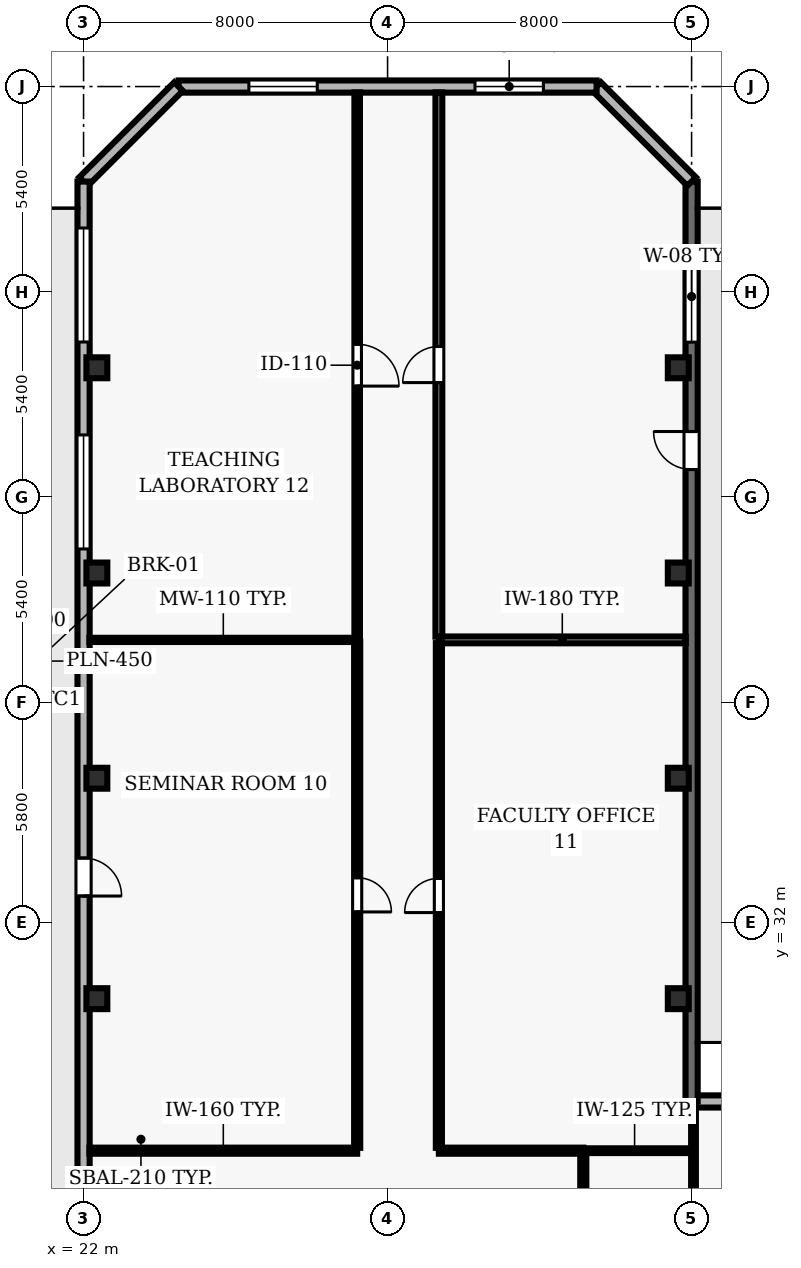
"""IFC4 building model, lengths in metres.
Left out: names, types, materials, properties, quantities, classifications, styles, units other than length and angle.
Written with IfcOpenShell. Run it as: python <this file> out.ifc"""

import sys

from ifc_helpers import new_model, si_unit, direction, frame, frame_2d, origin, origin_2d, place, context, subcontext, project, spatial, rectangle, hollow_rectangle, extrude, element, fill, save


model = new_model("IFC4")
c1 = context("Model", 3, precision=1e-05, world=origin(), true_north=direction((0.0, 1.0)))
c2 = subcontext(c1, "Body", "Model", "MODEL_VIEW")
j1 = project(units=[si_unit("LENGTHUNIT", "METRE"), si_unit("PLANEANGLEUNIT", "RADIAN")], contexts=[c1])
p1 = place(None, origin())
s1 = spatial("IfcSite", under=j1, at=p1, CompositionType="ELEMENT")
p2 = place(p1, origin())
s2 = spatial("IfcBuilding", under=s1, at=p2, CompositionType="ELEMENT")
p3 = place(p2, frame((0.0, 0.0, 50.5)))
s3 = spatial("IfcBuildingStorey", under=s2, at=p3, CompositionType="ELEMENT", Elevation=50.5)
for number, where, z_axis, x_axis in (
    (1, (22.35, 30.0, 0.0), (0.0, 0.0, 1.0), (1.0, 0.0, 0.0)),
    (2, (37.65, 30.0, 0.0), (0.0, 0.0, 1.0), (1.0, 0.0, 0.0)),
    (3, (22.35, 35.8, 0.0), (0.0, 0.0, 1.0), (1.0, 0.0, 0.0)),
    (4, (37.65, 35.8, 0.0), (0.0, 0.0, 1.0), (1.0, 0.0, 0.0)),
    (5, (22.35, 41.2, 0.0), (0.0, 0.0, 1.0), (1.0, 0.0, 0.0)),
    (6, (37.65, 41.2, 0.0), (0.0, 0.0, 1.0), (1.0, 0.0, 0.0)),
    (7, (22.35, 46.6, 0.0), (0.0, 0.0, 1.0), (1.0, 0.0, 0.0)),
    (8, (37.65, 46.6, 0.0), (0.0, 0.0, 1.0), (1.0, 0.0, 0.0)),
):
    element("IfcColumn", number, at=place(p3, frame(where, z_axis=z_axis, x_axis=x_axis)), inside=s3, PredefinedType="COLUMN", context=c2, shape_type="SweptSolid", body=[
        extrude(hollow_rectangle(XDim=0.55, YDim=0.55, WallThickness=0.025, at=origin_2d()), origin(), (0.0, 0.0, 1.0), 3.9),
    ])
p4 = place(p3, frame((51.4, 27.295, 0.0), z_axis=(0.0, 0.0, 1.0), x_axis=(-1.0, 0.0, 0.0)))
e9 = element("IfcWall", 9, at=p4, inside=s3, PredefinedType="SOLIDWALL", context=c2, shape_type="SweptSolid", body=[
    extrude(rectangle(XDim=13.4, YDim=0.32, at=frame_2d((6.7, 0.0))), origin(), (0.0, 0.0, 1.0), 3.69),
])
p5 = place(p4, frame((2.45, 0.0, 0.9)))
e10 = element("IfcOpeningElement", 10, at=p5, cuts=e9, PredefinedType="OPENING", context=c2, shape_type="SweptSolid", body=[
    extrude(rectangle(XDim=1.8, YDim=1.8, at=frame_2d((0.9, 0.9))), frame((0.0, 0.17, 0.0), z_axis=(0.0, -1.0, 0.0), x_axis=(1.0, 0.0, 0.0)), (0.0, 0.0, 1.0), 0.34),
])
p6 = place(p4, frame((9.15, 0.0, 0.9)))
e11 = element("IfcOpeningElement", 11, at=p6, cuts=e9, PredefinedType="OPENING", context=c2, shape_type="SweptSolid", body=[
    extrude(rectangle(XDim=1.8, YDim=1.8, at=frame_2d((0.9, 0.9))), frame((0.0, 0.17, 0.0), z_axis=(0.0, -1.0, 0.0), x_axis=(1.0, 0.0, 0.0)), (0.0, 0.0, 1.0), 0.34),
])
p7 = place(p3, frame((38.0, 27.295, 0.0), z_axis=(0.0, 0.0, 1.0), x_axis=(0.0, 1.0, 0.0)))
e12 = element("IfcWall", 12, at=p7, inside=s3, PredefinedType="SOLIDWALL", context=c2, shape_type="SweptSolid", body=[
    extrude(rectangle(XDim=24.205, YDim=0.32, at=frame_2d((12.103, 0.0))), origin(), (0.0, 0.0, 1.0), 3.69),
])
p8 = place(p7, frame((16.628, 0.0, 0.0)))
e13 = element("IfcOpeningElement", 13, at=p8, cuts=e12, PredefinedType="OPENING", context=c2, shape_type="SweptSolid", body=[
    extrude(rectangle(XDim=1.0, YDim=2.2, at=frame_2d((0.5, 1.1))), frame((0.0, 0.17, 0.0), z_axis=(0.0, -1.0, 0.0), x_axis=(1.0, 0.0, 0.0)), (0.0, 0.0, 1.0), 0.34),
])
p9 = place(p7, frame((19.979, 0.0, 0.9)))
e14 = element("IfcOpeningElement", 14, at=p9, cuts=e12, PredefinedType="OPENING", context=c2, shape_type="SweptSolid", body=[
    extrude(rectangle(XDim=2.4, YDim=1.8, at=frame_2d((1.2, 0.9))), frame((0.0, 0.17, 0.0), z_axis=(0.0, -1.0, 0.0), x_axis=(1.0, 0.0, 0.0)), (0.0, 0.0, 1.0), 0.34),
])
p10 = place(p3, frame((38.0, 51.5, 0.0), z_axis=(0.0, 0.0, 1.0), x_axis=(-0.707106781187, 0.707106781187, 0.0)))
e15 = element("IfcWall", 15, at=p10, inside=s3, PredefinedType="SOLIDWALL", context=c2, shape_type="SweptSolid", body=[
    extrude(rectangle(XDim=3.536, YDim=0.32, at=frame_2d((1.768, 0.0))), origin(), (0.0, 0.0, 1.0), 3.69),
])
p11 = place(p3, frame((35.5, 54.0, 0.0), z_axis=(0.0, 0.0, 1.0), x_axis=(-1.0, 0.0, 0.0)))
e16 = element("IfcWall", 16, at=p11, inside=s3, PredefinedType="SOLIDWALL", context=c2, shape_type="SweptSolid", body=[
    extrude(rectangle(XDim=11.0, YDim=0.32, at=frame_2d((5.5, 0.0))), origin(), (0.0, 0.0, 1.0), 3.69),
])
p12 = place(p11, frame((1.4, 0.0, 0.9)))
e17 = element("IfcOpeningElement", 17, at=p12, cuts=e16, PredefinedType="OPENING", context=c2, shape_type="SweptSolid", body=[
    extrude(rectangle(XDim=1.8, YDim=2.2, at=frame_2d((0.9, 1.1))), frame((0.0, 0.17, 0.0), z_axis=(0.0, -1.0, 0.0), x_axis=(1.0, 0.0, 0.0)), (0.0, 0.0, 1.0), 0.34),
])
p13 = place(p11, frame((7.35, 0.0, 0.9)))
e18 = element("IfcOpeningElement", 18, at=p13, cuts=e16, PredefinedType="OPENING", context=c2, shape_type="SweptSolid", body=[
    extrude(rectangle(XDim=1.8, YDim=2.2, at=frame_2d((0.9, 1.1))), frame((0.0, 0.17, 0.0), z_axis=(0.0, -1.0, 0.0), x_axis=(1.0, 0.0, 0.0)), (0.0, 0.0, 1.0), 0.34),
])
p14 = place(p3, frame((24.5, 54.0, 0.0), z_axis=(0.0, 0.0, 1.0), x_axis=(-0.707106781187, -0.707106781187, 0.0)))
e19 = element("IfcWall", 19, at=p14, inside=s3, PredefinedType="SOLIDWALL", context=c2, shape_type="SweptSolid", body=[
    extrude(rectangle(XDim=3.536, YDim=0.32, at=frame_2d((1.768, 0.0))), origin(), (0.0, 0.0, 1.0), 3.69),
])
p15 = place(p3, frame((22.0, 51.5, 0.0), z_axis=(0.0, 0.0, 1.0), x_axis=(0.0, -1.0, 0.0)))
e20 = element("IfcWall", 20, at=p15, inside=s3, PredefinedType="SOLIDWALL", context=c2, shape_type="SweptSolid", body=[
    extrude(rectangle(XDim=49.0, YDim=0.32, at=frame_2d((24.5, 0.0))), origin(), (0.0, 0.0, 1.0), 3.69),
])
p16 = place(p15, frame((17.8, 0.0, 0.0)))
e21 = element("IfcOpeningElement", 21, at=p16, cuts=e20, PredefinedType="OPENING", context=c2, shape_type="SweptSolid", body=[
    extrude(rectangle(XDim=1.0, YDim=2.2, at=frame_2d((0.5, 1.1))), frame((0.0, 0.17, 0.0), z_axis=(0.0, -1.0, 0.0), x_axis=(1.0, 0.0, 0.0)), (0.0, 0.0, 1.0), 0.34),
])
p17 = place(p15, frame((1.222, 0.0, 0.9)))
e22 = element("IfcOpeningElement", 22, at=p17, cuts=e20, PredefinedType="OPENING", context=c2, shape_type="SweptSolid", body=[
    extrude(rectangle(XDim=3.0, YDim=2.2, at=frame_2d((1.5, 1.1))), frame((0.0, 0.17, 0.0), z_axis=(0.0, -1.0, 0.0), x_axis=(1.0, 0.0, 0.0)), (0.0, 0.0, 1.0), 0.34),
])
p18 = place(p15, frame((6.667, 0.0, 0.9)))
e23 = element("IfcOpeningElement", 23, at=p18, cuts=e20, PredefinedType="OPENING", context=c2, shape_type="SweptSolid", body=[
    extrude(rectangle(XDim=3.0, YDim=2.2, at=frame_2d((1.5, 1.1))), frame((0.0, 0.17, 0.0), z_axis=(0.0, -1.0, 0.0), x_axis=(1.0, 0.0, 0.0)), (0.0, 0.0, 1.0), 0.34),
])
p19 = place(p15, frame((39.333, 0.0, 0.9)))
e24 = element("IfcOpeningElement", 24, at=p19, cuts=e20, PredefinedType="OPENING", context=c2, shape_type="SweptSolid", body=[
    extrude(rectangle(XDim=3.0, YDim=2.2, at=frame_2d((1.5, 1.1))), frame((0.0, 0.17, 0.0), z_axis=(0.0, -1.0, 0.0), x_axis=(1.0, 0.0, 0.0)), (0.0, 0.0, 1.0), 0.34),
])
p20 = place(p3, frame((29.2, 26.0, 0.0), z_axis=(0.0, 0.0, 1.0), x_axis=(-1.0, 0.0, 0.0)))
e25 = element("IfcWall", 25, at=p20, inside=s3, PredefinedType="PARTITIONING", context=c2, shape_type="SweptSolid", body=[
    extrude(rectangle(XDim=7.045, YDim=0.16, at=frame_2d((3.522, 0.0))), origin(), (0.0, 0.0, 1.0), 3.69),
])
p21 = place(p3, frame((29.2, 39.44, 0.0), z_axis=(0.0, 0.0, 1.0), x_axis=(-1.0, 0.0, 0.0)))
e26 = element("IfcWall", 26, at=p21, inside=s3, PredefinedType="MOVABLE", context=c2, shape_type="SweptSolid", body=[
    extrude(rectangle(XDim=7.045, YDim=0.11, at=frame_2d((3.522, 0.0))), origin(), (0.0, 0.0, 1.0), 3.69),
])
p22 = place(p3, frame((35.15, 26.0, 0.0), z_axis=(0.0, 0.0, 1.0), x_axis=(-1.0, 0.0, 0.0)))
e27 = element("IfcWall", 27, at=p22, inside=s3, PredefinedType="PARTITIONING", context=c2, shape_type="SweptSolid", body=[
    extrude(rectangle(XDim=3.8, YDim=0.16, at=frame_2d((1.9, 0.0))), origin(), (0.0, 0.0, 1.0), 3.69),
])
p23 = place(p3, frame((35.15, 26.0, 0.0), z_axis=(0.0, 0.0, 1.0), x_axis=(1.0, 0.0, 0.0)))
e28 = element("IfcWall", 28, at=p23, inside=s3, PredefinedType="PARTITIONING", context=c2, shape_type="SweptSolid", body=[
    extrude(rectangle(XDim=2.7, YDim=0.125, at=frame_2d((1.35, 0.0))), origin(), (0.0, 0.0, 1.0), 3.69),
])
p24 = place(p3, frame((37.845, 39.44, 0.0), z_axis=(0.0, 0.0, 1.0), x_axis=(-1.0, 0.0, 0.0)))
e29 = element("IfcWall", 29, at=p24, inside=s3, PredefinedType="PARTITIONING", context=c2, shape_type="SweptSolid", body=[
    extrude(rectangle(XDim=6.495, YDim=0.18, at=frame_2d((3.248, 0.0))), origin(), (0.0, 0.0, 1.0), 3.69),
])
p25 = place(p3, frame((29.2, 39.39, 0.0), z_axis=(0.0, 0.0, 1.0), x_axis=(0.0, -1.0, 0.0)))
e30 = element("IfcWall", 30, at=p25, inside=s3, PredefinedType="PARTITIONING", context=c2, shape_type="SweptSolid", body=[
    extrude(rectangle(XDim=13.315, YDim=0.16, at=frame_2d((6.657, 0.0))), origin(), (0.0, 0.0, 1.0), 3.69),
])
p26 = place(p25, frame((6.208, 0.0, 0.0)))
e31 = element("IfcOpeningElement", 31, at=p26, cuts=e30, PredefinedType="OPENING", context=c2, shape_type="SweptSolid", body=[
    extrude(rectangle(XDim=0.9, YDim=2.1, at=frame_2d((0.45, 1.05))), frame((0.0, 0.09, 0.0), z_axis=(0.0, -1.0, 0.0), x_axis=(1.0, 0.0, 0.0)), (0.0, 0.0, 1.0), 0.18),
])
p27 = place(p3, frame((29.2, 53.845, 0.0), z_axis=(0.0, 0.0, 1.0), x_axis=(0.0, -1.0, 0.0)))
e32 = element("IfcWall", 32, at=p27, inside=s3, PredefinedType="PARTITIONING", context=c2, shape_type="SweptSolid", body=[
    extrude(rectangle(XDim=14.355, YDim=0.145, at=frame_2d((7.177, 0.0))), origin(), (0.0, 0.0, 1.0), 3.69),
])
p28 = place(p27, frame((6.627, 0.0, 0.0)))
e33 = element("IfcOpeningElement", 33, at=p28, cuts=e32, PredefinedType="OPENING", context=c2, shape_type="SweptSolid", body=[
    extrude(rectangle(XDim=1.1, YDim=2.15, at=frame_2d((0.55, 1.075))), frame((0.0, 0.083, 0.0), z_axis=(0.0, -1.0, 0.0), x_axis=(1.0, 0.0, 0.0)), (0.0, 0.0, 1.0), 0.165),
])
p29 = place(p3, frame((31.35, 26.075, 0.0), z_axis=(0.0, 0.0, 1.0), x_axis=(0.0, 1.0, 0.0)))
e34 = element("IfcWall", 34, at=p29, inside=s3, PredefinedType="PARTITIONING", context=c2, shape_type="SweptSolid", body=[
    extrude(rectangle(XDim=13.28, YDim=0.16, at=frame_2d((6.64, 0.0))), origin(), (0.0, 0.0, 1.0), 3.69),
])
p30 = place(p29, frame((6.19, 0.0, 0.0)))
e35 = element("IfcOpeningElement", 35, at=p30, cuts=e34, PredefinedType="OPENING", context=c2, shape_type="SweptSolid", body=[
    extrude(rectangle(XDim=0.9, YDim=2.1, at=frame_2d((0.45, 1.05))), frame((0.0, 0.09, 0.0), z_axis=(0.0, -1.0, 0.0), x_axis=(1.0, 0.0, 0.0)), (0.0, 0.0, 1.0), 0.18),
])
p31 = place(p3, frame((31.35, 39.525, 0.0), z_axis=(0.0, 0.0, 1.0), x_axis=(0.0, 1.0, 0.0)))
e36 = element("IfcWall", 36, at=p31, inside=s3, PredefinedType="PARTITIONING", context=c2, shape_type="SweptSolid", body=[
    extrude(rectangle(XDim=14.32, YDim=0.18, at=frame_2d((7.16, 0.0))), origin(), (0.0, 0.0, 1.0), 3.69),
])
p32 = place(p31, frame((6.685, 0.0, 0.0)))
e37 = element("IfcOpeningElement", 37, at=p32, cuts=e36, PredefinedType="OPENING", context=c2, shape_type="SweptSolid", body=[
    extrude(rectangle(XDim=0.95, YDim=2.1, at=frame_2d((0.475, 1.05))), frame((0.0, 0.1, 0.0), z_axis=(0.0, -1.0, 0.0), x_axis=(1.0, 0.0, 0.0)), (0.0, 0.0, 1.0), 0.2),
])
p33 = place(p3, frame((35.15, 24.07, 0.0), z_axis=(0.0, 0.0, 1.0), x_axis=(0.0, 1.0, 0.0)))
e38 = element("IfcWall", 38, at=p33, inside=s3, PredefinedType="PARTITIONING", context=c2, shape_type="SweptSolid", body=[
    extrude(rectangle(XDim=1.855, YDim=0.16, at=frame_2d((0.927, 0.0))), origin(), (0.0, 0.0, 1.0), 3.69),
])
p34 = place(p3, frame((38.05, 27.14, 0.0), z_axis=(0.0, 0.0, 1.0), x_axis=(0.0, -1.0, 0.0)))
e39 = element("IfcWall", 39, at=p34, inside=s3, PredefinedType="PARTITIONING", context=c2, shape_type="SweptSolid", body=[
    extrude(rectangle(XDim=3.09, YDim=0.125, at=frame_2d((1.545, 0.0))), origin(), (0.0, 0.0, 1.0), 3.055),
])
p35 = place(p8, origin())
e40 = element("IfcDoor", 40, at=p35, inside=s3, OperationType="SINGLE_SWING_RIGHT", PredefinedType="DOOR", context=c2, shape_type="SweptSolid", body=[
    extrude(rectangle(XDim=1.0, YDim=2.2, at=frame_2d((0.5, 1.1))), frame((0.0, 0.025, 0.0), z_axis=(0.0, -1.0, 0.0), x_axis=(1.0, 0.0, 0.0)), (0.0, 0.0, 1.0), 0.05),
])
fill(e13, e40)
p36 = place(p9, origin())
e41 = element("IfcWindow", 41, at=p36, inside=s3, PartitioningType="SINGLE_PANEL", PredefinedType="WINDOW", context=c2, shape_type="SweptSolid", body=[
    extrude(rectangle(XDim=2.4, YDim=1.8, at=frame_2d((1.2, 0.9))), frame((0.0, 0.03, 0.0), z_axis=(0.0, -1.0, 0.0), x_axis=(1.0, 0.0, 0.0)), (0.0, 0.0, 1.0), 0.06),
])
fill(e14, e41)
p37 = place(p12, origin())
e42 = element("IfcWindow", 42, at=p37, inside=s3, PartitioningType="SINGLE_PANEL", PredefinedType="WINDOW", context=c2, shape_type="SweptSolid", body=[
    extrude(rectangle(XDim=1.8, YDim=2.2, at=frame_2d((0.9, 1.1))), frame((0.0, 0.03, 0.0), z_axis=(0.0, -1.0, 0.0), x_axis=(1.0, 0.0, 0.0)), (0.0, 0.0, 1.0), 0.06),
])
fill(e17, e42)
p38 = place(p13, origin())
e43 = element("IfcWindow", 43, at=p38, inside=s3, PartitioningType="SINGLE_PANEL", PredefinedType="WINDOW", context=c2, shape_type="SweptSolid", body=[
    extrude(rectangle(XDim=1.8, YDim=2.2, at=frame_2d((0.9, 1.1))), frame((0.0, 0.03, 0.0), z_axis=(0.0, -1.0, 0.0), x_axis=(1.0, 0.0, 0.0)), (0.0, 0.0, 1.0), 0.06),
])
fill(e18, e43)
p39 = place(p16, origin())
e44 = element("IfcDoor", 44, at=p39, inside=s3, OperationType="SINGLE_SWING_RIGHT", PredefinedType="DOOR", context=c2, shape_type="SweptSolid", body=[
    extrude(rectangle(XDim=1.0, YDim=2.2, at=frame_2d((0.5, 1.1))), frame((0.0, 0.025, 0.0), z_axis=(0.0, -1.0, 0.0), x_axis=(1.0, 0.0, 0.0)), (0.0, 0.0, 1.0), 0.05),
])
fill(e21, e44)
p40 = place(p17, origin())
e45 = element("IfcWindow", 45, at=p40, inside=s3, PartitioningType="SINGLE_PANEL", PredefinedType="WINDOW", context=c2, shape_type="SweptSolid", body=[
    extrude(rectangle(XDim=3.0, YDim=2.2, at=frame_2d((1.5, 1.1))), frame((0.0, 0.03, 0.0), z_axis=(0.0, -1.0, 0.0), x_axis=(1.0, 0.0, 0.0)), (0.0, 0.0, 1.0), 0.06),
])
fill(e22, e45)
p41 = place(p18, origin())
e46 = element("IfcWindow", 46, at=p41, inside=s3, PartitioningType="SINGLE_PANEL", PredefinedType="WINDOW", context=c2, shape_type="SweptSolid", body=[
    extrude(rectangle(XDim=3.0, YDim=2.2, at=frame_2d((1.5, 1.1))), frame((0.0, 0.03, 0.0), z_axis=(0.0, -1.0, 0.0), x_axis=(1.0, 0.0, 0.0)), (0.0, 0.0, 1.0), 0.06),
])
fill(e23, e46)
p42 = place(p26, origin())
e47 = element("IfcDoor", 47, at=p42, inside=s3, OperationType="SINGLE_SWING_RIGHT", PredefinedType="DOOR", context=c2, shape_type="SweptSolid", body=[
    extrude(rectangle(XDim=0.9, YDim=2.1, at=frame_2d((0.45, 1.05))), frame((0.0, 0.025, 0.0), z_axis=(0.0, -1.0, 0.0), x_axis=(1.0, 0.0, 0.0)), (0.0, 0.0, 1.0), 0.05),
])
fill(e31, e47)
p43 = place(p30, origin())
e48 = element("IfcDoor", 48, at=p43, inside=s3, OperationType="SINGLE_SWING_LEFT", PredefinedType="DOOR", context=c2, shape_type="SweptSolid", body=[
    extrude(rectangle(XDim=0.9, YDim=2.1, at=frame_2d((0.45, 1.05))), frame((0.0, 0.025, 0.0), z_axis=(0.0, -1.0, 0.0), x_axis=(1.0, 0.0, 0.0)), (0.0, 0.0, 1.0), 0.05),
])
fill(e35, e48)
p44 = place(p28, origin())
e49 = element("IfcDoor", 49, at=p44, inside=s3, OperationType="SINGLE_SWING_RIGHT", PredefinedType="DOOR", context=c2, shape_type="SweptSolid", body=[
    extrude(rectangle(XDim=1.1, YDim=2.15, at=frame_2d((0.55, 1.075))), frame((0.0, 0.025, 0.0), z_axis=(0.0, -1.0, 0.0), x_axis=(1.0, 0.0, 0.0)), (0.0, 0.0, 1.0), 0.05),
])
fill(e33, e49)
p45 = place(p32, origin())
e50 = element("IfcDoor", 50, at=p45, inside=s3, OperationType="SINGLE_SWING_LEFT", PredefinedType="DOOR", context=c2, shape_type="SweptSolid", body=[
    extrude(rectangle(XDim=0.95, YDim=2.1, at=frame_2d((0.475, 1.05))), frame((0.0, 0.025, 0.0), z_axis=(0.0, -1.0, 0.0), x_axis=(1.0, 0.0, 0.0)), (0.0, 0.0, 1.0), 0.05),
])
fill(e37, e50)
save(model, sys.argv[1])
